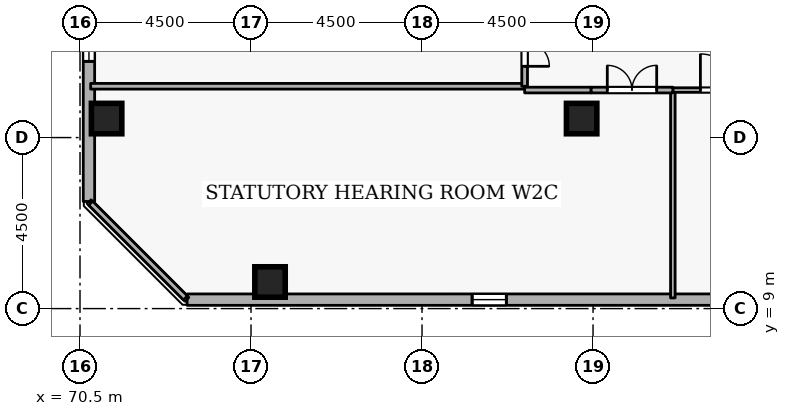
"""IFC4 building model, lengths in metres.
Left out: names, types, materials, properties, quantities, classifications, styles, units other than length and angle.
Written with IfcOpenShell. Run it as: python <this file> out.ifc"""

import sys

from ifc_helpers import new_model, si_unit, direction, frame, frame_2d, origin, origin_2d, place, context, subcontext, project, spatial, rectangle, extrude, element, fill, save


model = new_model("IFC4")
c1 = context("Model", 3, precision=1e-05, world=origin(), true_north=direction((0.0, 1.0)))
c2 = subcontext(c1, "Body", "Model", "MODEL_VIEW")
j1 = project(units=[si_unit("LENGTHUNIT", "METRE"), si_unit("PLANEANGLEUNIT", "RADIAN")], contexts=[c1])
p1 = place(None, origin())
s1 = spatial("IfcSite", under=j1, at=p1, CompositionType="ELEMENT")
p2 = place(p1, origin())
s2 = spatial("IfcBuilding", under=s1, at=p2, CompositionType="ELEMENT")
p3 = place(p2, frame((0.0, 0.0, 272.7)))
s3 = spatial("IfcBuildingStorey", under=s2, at=p3, CompositionType="ELEMENT", Elevation=272.7)
for number, where, z_axis, x_axis in (
    (1, (71.2, 14.0, 0.0), (0.0, 0.0, 1.0), (1.0, 0.0, 0.0)),
    (2, (75.5, 9.7, 0.0), (0.0, 0.0, 1.0), (1.0, 0.0, 0.0)),
    (3, (83.7, 14.0, 0.0), (0.0, 0.0, 1.0), (1.0, 0.0, 0.0)),
):
    element("IfcColumn", number, at=place(p3, frame(where, z_axis=z_axis, x_axis=x_axis)), inside=s3, PredefinedType="COLUMN", context=c2, shape_type="SweptSolid", body=[
        extrude(rectangle(XDim=0.8, YDim=0.8, at=origin_2d()), origin(), (0.0, 0.0, 1.0), 3.6),
    ])
p4 = place(p3, frame((73.319, 9.235, 0.0), z_axis=(0.0, 0.0, 1.0), x_axis=(0.999999999634, 2.7061402e-05, 0.0)))
e4 = element("IfcWall", 4, at=p4, inside=s3, PredefinedType="STANDARD", context=c2, shape_type="SweptSolid", body=[
    extrude(rectangle(XDim=36.087, YDim=0.3, at=frame_2d((18.043, 0.0))), origin(), (0.0, 0.0, 1.0), 2.7),
])
p5 = place(p4, frame((7.5, 0.0, 0.72)))
e5 = element("IfcOpeningElement", 5, at=p5, cuts=e4, PredefinedType="OPENING", context=c2, shape_type="SweptSolid", body=[
    extrude(rectangle(XDim=0.9, YDim=1.75, at=frame_2d((0.45, 0.875))), frame((0.0, 0.16, 0.0), z_axis=(0.0, -1.0, 0.0), x_axis=(1.0, 0.0, 0.0)), (0.0, 0.0, 1.0), 0.32),
])
p6 = place(p4, frame((21.9, 0.0, 0.72)))
e6 = element("IfcOpeningElement", 6, at=p6, cuts=e4, PredefinedType="OPENING", context=c2, shape_type="SweptSolid", body=[
    extrude(rectangle(XDim=0.9, YDim=1.75, at=frame_2d((0.45, 0.875))), frame((0.0, 0.16, 0.0), z_axis=(0.0, -1.0, 0.0), x_axis=(1.0, 0.0, 0.0)), (0.0, 0.0, 1.0), 0.32),
])
p7 = place(p4, frame((31.5, 0.0, 0.72)))
e7 = element("IfcOpeningElement", 7, at=p7, cuts=e4, PredefinedType="OPENING", context=c2, shape_type="SweptSolid", body=[
    extrude(rectangle(XDim=0.9, YDim=1.75, at=frame_2d((0.45, 0.875))), frame((0.0, 0.16, 0.0), z_axis=(0.0, -1.0, 0.0), x_axis=(1.0, 0.0, 0.0)), (0.0, 0.0, 1.0), 0.32),
])
p8 = place(p3, frame((70.736, 47.906, 0.0), z_axis=(0.0, 0.0, 1.0), x_axis=(-2.7061402e-05, -0.999999999634, 0.0)))
e8 = element("IfcWall", 8, at=p8, inside=s3, PredefinedType="STANDARD", context=c2, shape_type="SweptSolid", body=[
    extrude(rectangle(XDim=36.087, YDim=0.3, at=frame_2d((18.043, 0.0))), origin(), (0.0, 0.0, 1.0), 2.7),
])
p9 = place(p8, frame((2.7, 0.0, 0.72)))
e9 = element("IfcOpeningElement", 9, at=p9, cuts=e8, PredefinedType="OPENING", context=c2, shape_type="SweptSolid", body=[
    extrude(rectangle(XDim=0.9, YDim=1.75, at=frame_2d((0.45, 0.875))), frame((0.0, 0.16, 0.0), z_axis=(0.0, -1.0, 0.0), x_axis=(1.0, 0.0, 0.0)), (0.0, 0.0, 1.0), 0.32),
])
p10 = place(p8, frame((12.3, 0.0, 0.72)))
e10 = element("IfcOpeningElement", 10, at=p10, cuts=e8, PredefinedType="OPENING", context=c2, shape_type="SweptSolid", body=[
    extrude(rectangle(XDim=0.9, YDim=1.75, at=frame_2d((0.45, 0.875))), frame((0.0, 0.16, 0.0), z_axis=(0.0, -1.0, 0.0), x_axis=(1.0, 0.0, 0.0)), (0.0, 0.0, 1.0), 0.32),
])
p11 = place(p8, frame((17.1, 0.0, 0.72)))
e11 = element("IfcOpeningElement", 11, at=p11, cuts=e8, PredefinedType="OPENING", context=c2, shape_type="SweptSolid", body=[
    extrude(rectangle(XDim=0.9, YDim=1.75, at=frame_2d((0.45, 0.875))), frame((0.0, 0.16, 0.0), z_axis=(0.0, -1.0, 0.0), x_axis=(1.0, 0.0, 0.0)), (0.0, 0.0, 1.0), 0.32),
])
p12 = place(p8, frame((26.7, 0.0, 0.72)))
e12 = element("IfcOpeningElement", 12, at=p12, cuts=e8, PredefinedType="OPENING", context=c2, shape_type="SweptSolid", body=[
    extrude(rectangle(XDim=0.9, YDim=1.75, at=frame_2d((0.45, 0.875))), frame((0.0, 0.16, 0.0), z_axis=(0.0, -1.0, 0.0), x_axis=(1.0, 0.0, 0.0)), (0.0, 0.0, 1.0), 0.32),
])
p13 = place(p8, frame((31.5, 0.0, 0.72)))
e13 = element("IfcOpeningElement", 13, at=p13, cuts=e8, PredefinedType="OPENING", context=c2, shape_type="SweptSolid", body=[
    extrude(rectangle(XDim=0.9, YDim=1.75, at=frame_2d((0.45, 0.875))), frame((0.0, 0.16, 0.0), z_axis=(0.0, -1.0, 0.0), x_axis=(1.0, 0.0, 0.0)), (0.0, 0.0, 1.0), 0.32),
])
p14 = place(p3, frame((82.2, 14.85, 0.0), z_axis=(0.0, 0.0, 1.0), x_axis=(-1.0, 0.0, 0.0)))
e14 = element("IfcWall", 14, at=p14, inside=s3, PredefinedType="PARTITIONING", context=c2, shape_type="SweptSolid", body=[
    extrude(rectangle(XDim=11.42, YDim=0.15, at=frame_2d((5.71, 0.0))), origin(), (0.0, 0.0, 1.0), 3.34),
])
p15 = place(p3, frame((82.2, 17.2, 0.0), z_axis=(0.0, 0.0, 1.0), x_axis=(0.0, -1.0, 0.0)))
e15 = element("IfcWall", 15, at=p15, inside=s3, PredefinedType="PARTITIONING", context=c2, shape_type="SweptSolid", body=[
    extrude(rectangle(XDim=2.35, YDim=0.15, at=frame_2d((1.175, 0.0))), origin(), (0.0, 0.0, 1.0), 3.34),
])
p16 = place(p15, frame((0.525, 0.0, 0.0)))
e16 = element("IfcOpeningElement", 16, at=p16, cuts=e15, PredefinedType="OPENING", context=c2, shape_type="SweptSolid", body=[
    extrude(rectangle(XDim=1.3, YDim=2.12, at=frame_2d((0.65, 1.06))), frame((0.0, 0.085, 0.0), z_axis=(0.0, -1.0, 0.0), x_axis=(1.0, 0.0, 0.0)), (0.0, 0.0, 1.0), 0.17),
])
p17 = place(p3, frame((86.1, 9.28, 0.0), z_axis=(0.0, 0.0, 1.0), x_axis=(0.0, 1.0, 0.0)))
e17 = element("IfcWall", 17, at=p17, inside=s3, PredefinedType="PARTITIONING", context=c2, shape_type="SweptSolid", body=[
    extrude(rectangle(XDim=5.47, YDim=0.12, at=frame_2d((2.735, 0.0))), origin(), (0.0, 0.0, 1.0), 3.34),
])
p18 = place(p3, frame((86.1, 14.75, 0.0), z_axis=(0.0, 0.0, 1.0), x_axis=(1.0, 0.0, 0.0)))
e18 = element("IfcWall", 18, at=p18, inside=s3, PredefinedType="PARTITIONING", context=c2, shape_type="SweptSolid", body=[
    extrude(rectangle(XDim=2.4, YDim=0.12, at=frame_2d((1.2, 0.0))), origin(), (0.0, 0.0, 1.0), 3.34),
])
p19 = place(p18, frame((0.725, 0.0, 0.0)))
e19 = element("IfcOpeningElement", 19, at=p19, cuts=e18, PredefinedType="OPENING", context=c2, shape_type="SweptSolid", body=[
    extrude(rectangle(XDim=0.95, YDim=2.1, at=frame_2d((0.475, 1.05))), frame((0.0, 0.07, 0.0), z_axis=(0.0, -1.0, 0.0), x_axis=(1.0, 0.0, 0.0)), (0.0, 0.0, 1.0), 0.14),
])
p20 = place(p3, frame((73.275, 9.28, 0.0), z_axis=(0.0, 0.0, 1.0), x_axis=(-0.707106781187, 0.707106781187, 0.0)))
e20 = element("IfcWall", 20, at=p20, inside=s3, PredefinedType="PARTITIONING", context=c2, shape_type="SweptSolid", body=[
    extrude(rectangle(XDim=3.528, YDim=0.15, at=frame_2d((1.764, 0.0))), origin(), (0.0, 0.0, 1.0), 3.34),
])
p21 = place(p3, frame((82.2, 14.75, 0.0), z_axis=(0.0, 0.0, 1.0), x_axis=(1.0, 0.0, 0.0)))
e21 = element("IfcWall", 21, at=p21, inside=s3, PredefinedType="PARTITIONING", context=c2, shape_type="SweptSolid", body=[
    extrude(rectangle(XDim=1.75, YDim=0.15, at=frame_2d((0.875, 0.0))), origin(), (0.0, 0.0, 1.0), 3.34),
])
p22 = place(p3, frame((83.95, 14.75, 0.0), z_axis=(0.0, 0.0, 1.0), x_axis=(1.0, 0.0, 0.0)))
e22 = element("IfcWall", 22, at=p22, inside=s3, PredefinedType="PARTITIONING", context=c2, shape_type="SweptSolid", body=[
    extrude(rectangle(XDim=2.15, YDim=0.15, at=frame_2d((1.075, 0.0))), origin(), (0.0, 0.0, 1.0), 3.34),
])
p23 = place(p22, frame((0.425, 0.0, 0.0)))
e23 = element("IfcOpeningElement", 23, at=p23, cuts=e22, PredefinedType="OPENING", context=c2, shape_type="SweptSolid", body=[
    extrude(rectangle(XDim=1.3, YDim=2.12, at=frame_2d((0.65, 1.06))), frame((0.0, 0.085, 0.0), z_axis=(0.0, -1.0, 0.0), x_axis=(1.0, 0.0, 0.0)), (0.0, 0.0, 1.0), 0.17),
])
p24 = place(p5, origin())
e24 = element("IfcWindow", 24, at=p24, inside=s3, PartitioningType="SINGLE_PANEL", PredefinedType="WINDOW", context=c2, shape_type="SweptSolid", body=[
    extrude(rectangle(XDim=0.9, YDim=1.75, at=frame_2d((0.45, 0.875))), frame((0.0, 0.03, 0.0), z_axis=(0.0, -1.0, 0.0), x_axis=(1.0, 0.0, 0.0)), (0.0, 0.0, 1.0), 0.06),
])
fill(e5, e24)
p25 = place(p13, origin())
e25 = element("IfcWindow", 25, at=p25, inside=s3, PartitioningType="SINGLE_PANEL", PredefinedType="WINDOW", context=c2, shape_type="SweptSolid", body=[
    extrude(rectangle(XDim=0.9, YDim=1.75, at=frame_2d((0.45, 0.875))), frame((0.0, 0.03, 0.0), z_axis=(0.0, -1.0, 0.0), x_axis=(1.0, 0.0, 0.0)), (0.0, 0.0, 1.0), 0.06),
])
fill(e13, e25)
p26 = place(p16, origin())
e26 = element("IfcDoor", 26, at=p26, inside=s3, OperationType="DOUBLE_DOOR_SINGLE_SWING", PredefinedType="DOOR", context=c2, shape_type="SweptSolid", body=[
    extrude(rectangle(XDim=1.3, YDim=2.12, at=frame_2d((0.65, 1.06))), frame((0.0, 0.025, 0.0), z_axis=(0.0, -1.0, 0.0), x_axis=(1.0, 0.0, 0.0)), (0.0, 0.0, 1.0), 0.05),
])
fill(e16, e26)
p27 = place(p19, origin())
e27 = element("IfcDoor", 27, at=p27, inside=s3, OperationType="SINGLE_SWING_LEFT", PredefinedType="DOOR", context=c2, shape_type="SweptSolid", body=[
    extrude(rectangle(XDim=0.95, YDim=2.1, at=frame_2d((0.475, 1.05))), frame((0.0, 0.025, 0.0), z_axis=(0.0, -1.0, 0.0), x_axis=(1.0, 0.0, 0.0)), (0.0, 0.0, 1.0), 0.05),
])
fill(e19, e27)
p28 = place(p23, origin())
e28 = element("IfcDoor", 28, at=p28, inside=s3, OperationType="DOUBLE_DOOR_SINGLE_SWING", PredefinedType="DOOR", context=c2, shape_type="SweptSolid", body=[
    extrude(rectangle(XDim=1.3, YDim=2.12, at=frame_2d((0.65, 1.06))), frame((0.0, 0.025, 0.0), z_axis=(0.0, -1.0, 0.0), x_axis=(1.0, 0.0, 0.0)), (0.0, 0.0, 1.0), 0.05),
])
fill(e23, e28)
save(model, sys.argv[1])
